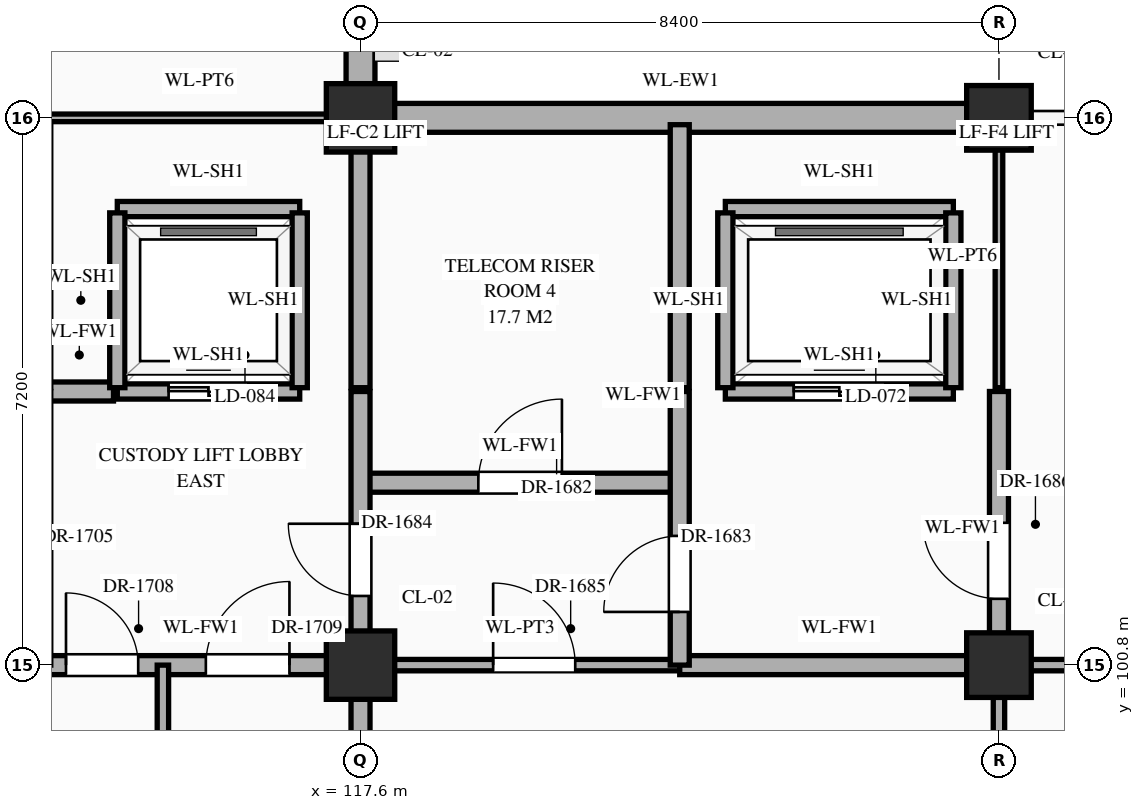
"""IFC4 building model, lengths in metres.
Left out: names, types, materials, properties, quantities, classifications, styles, units other than length and angle.
Written with IfcOpenShell. Run it as: python <this file> out.ifc"""

import sys

from ifc_helpers import new_model, si_unit, direction, frame, frame_2d, origin, origin_2d, place, context, subcontext, project, spatial, rectangle, extrude, element, fill, save


model = new_model("IFC4")
c1 = context("Model", 3, precision=1e-05, world=origin(), true_north=direction((0.0, 1.0)))
c2 = subcontext(c1, "Body", "Model", "MODEL_VIEW")
j1 = project(units=[si_unit("LENGTHUNIT", "METRE"), si_unit("PLANEANGLEUNIT", "RADIAN")], contexts=[c1])
p1 = place(None, origin())
s1 = spatial("IfcSite", under=j1, at=p1, CompositionType="ELEMENT")
p2 = place(p1, origin())
s2 = spatial("IfcBuilding", under=s1, at=p2, CompositionType="ELEMENT")
p3 = place(p2, frame((0.0, 0.0, 16.2)))
s3 = spatial("IfcBuildingStorey", under=s2, at=p3, CompositionType="ELEMENT", Elevation=16.2)
for number, where, z_axis, x_axis in (
    (1, (117.6, 100.8, 0.0), (0.0, 0.0, 1.0), (1.0, 0.0, 0.0)),
    (2, (117.6, 108.0, 0.0), (0.0, 0.0, 1.0), (1.0, 0.0, 0.0)),
):
    element("IfcColumn", number, at=place(p3, frame(where, z_axis=z_axis, x_axis=x_axis)), inside=s3, PredefinedType="COLUMN", context=c2, shape_type="SweptSolid", body=[
        extrude(rectangle(XDim=0.9, YDim=0.9, at=origin_2d()), origin(), (0.0, 0.0, 1.0), 5.4),
    ])
for number, where, z_axis, x_axis in (
    (3, (126.0, 100.8, 0.0), (0.0, 0.0, 1.0), (1.0, 0.0, 0.0)),
    (4, (126.0, 108.0, 0.0), (0.0, 0.0, 1.0), (1.0, 0.0, 0.0)),
):
    element("IfcColumn", number, at=place(p3, frame(where, z_axis=z_axis, x_axis=x_axis)), inside=s3, PredefinedType="COLUMN", context=c2, shape_type="SweptSolid", body=[
        extrude(rectangle(XDim=0.85, YDim=0.85, at=origin_2d()), origin(), (0.0, 0.0, 1.0), 5.4),
    ])
p4 = place(p3, frame((117.6, 108.445, 0.0), z_axis=(0.0, 0.0, 1.0), x_axis=(0.0, 1.0, 0.0)))
e5 = element("IfcWall", 5, at=p4, inside=s3, PredefinedType="STANDARD", context=c2, shape_type="SweptSolid", body=[
    extrude(rectangle(XDim=6.335, YDim=0.38, at=frame_2d((3.167, 0.0))), origin(), (0.0, 0.0, 1.0), 4.47),
])
p5 = place(p4, frame((3.78, 0.0, 0.85)))
e6 = element("IfcOpeningElement", 6, at=p5, cuts=e5, PredefinedType="OPENING", context=c2, shape_type="SweptSolid", body=[
    extrude(rectangle(XDim=1.35, YDim=1.38, at=frame_2d((0.675, 0.69))), frame((0.0, 0.202, 0.0), z_axis=(0.0, -1.0, 0.0), x_axis=(1.0, 0.0, 0.0)), (0.0, 0.0, 1.0), 0.404),
])
p6 = place(p3, frame((118.045, 108.0, 0.0), z_axis=(0.0, 0.0, 1.0), x_axis=(1.0, 0.0, 0.0)))
e7 = element("IfcWall", 7, at=p6, inside=s3, PredefinedType="STANDARD", context=c2, shape_type="SweptSolid", body=[
    extrude(rectangle(XDim=7.535, YDim=0.38, at=frame_2d((3.768, 0.0))), origin(), (0.0, 0.0, 1.0), 4.47),
])
p7 = place(p3, frame((113.4, 100.8, 0.0), z_axis=(0.0, 0.0, 1.0), x_axis=(1.0, 0.0, 0.0)))
e8 = element("IfcWall", 8, at=p7, inside=s3, PredefinedType="STANDARD", context=c2, shape_type="SweptSolid", body=[
    extrude(rectangle(XDim=4.2, YDim=0.25, at=frame_2d((2.1, 0.0))), origin(), (0.0, 0.0, 1.0), 4.27),
])
p8 = place(p7, frame((0.325, 0.0, 0.0)))
e9 = element("IfcOpeningElement", 9, at=p8, cuts=e8, PredefinedType="OPENING", context=c2, shape_type="SweptSolid", body=[
    extrude(rectangle(XDim=0.95, YDim=2.15, at=frame_2d((0.475, 1.075))), frame((0.0, 0.137, 0.0), z_axis=(0.0, -1.0, 0.0), x_axis=(1.0, 0.0, 0.0)), (0.0, 0.0, 1.0), 0.274),
])
p9 = place(p7, frame((2.165, 0.0, 0.0)))
e10 = element("IfcOpeningElement", 10, at=p9, cuts=e8, PredefinedType="OPENING", context=c2, shape_type="SweptSolid", body=[
    extrude(rectangle(XDim=1.1, YDim=2.2, at=frame_2d((0.55, 1.1))), frame((0.0, 0.137, 0.0), z_axis=(0.0, -1.0, 0.0), x_axis=(1.0, 0.0, 0.0)), (0.0, 0.0, 1.0), 0.274),
])
p10 = place(p3, frame((117.6, 100.8, 0.0), z_axis=(0.0, 0.0, 1.0), x_axis=(1.0, 0.0, 0.0)))
e11 = element("IfcWall", 11, at=p10, inside=s3, PredefinedType="STANDARD", context=c2, shape_type="SweptSolid", body=[
    extrude(rectangle(XDim=4.2, YDim=0.15, at=frame_2d((2.1, 0.0))), origin(), (0.0, 0.0, 1.0), 4.27),
])
p11 = place(p10, frame((1.745, 0.0, 0.0)))
e12 = element("IfcOpeningElement", 12, at=p11, cuts=e11, PredefinedType="OPENING", context=c2, shape_type="SweptSolid", body=[
    extrude(rectangle(XDim=1.08, YDim=2.25, at=frame_2d((0.54, 1.125))), frame((0.0, 0.087, 0.0), z_axis=(0.0, -1.0, 0.0), x_axis=(1.0, 0.0, 0.0)), (0.0, 0.0, 1.0), 0.174),
])
p12 = place(p3, frame((121.8, 100.8, 0.0), z_axis=(0.0, 0.0, 1.0), x_axis=(1.0, 0.0, 0.0)))
e13 = element("IfcWall", 13, at=p12, inside=s3, PredefinedType="STANDARD", context=c2, shape_type="SweptSolid", body=[
    extrude(rectangle(XDim=4.2, YDim=0.25, at=frame_2d((2.1, 0.0))), origin(), (0.0, 0.0, 1.0), 4.27),
])
p13 = place(p3, frame((126.0, 100.8, 0.0), z_axis=(0.0, 0.0, 1.0), x_axis=(1.0, 0.0, 0.0)))
e14 = element("IfcWall", 14, at=p13, inside=s3, PredefinedType="STANDARD", context=c2, shape_type="SweptSolid", body=[
    extrude(rectangle(XDim=8.4, YDim=0.15, at=frame_2d((4.2, 0.0))), origin(), (0.0, 0.0, 1.0), 4.27),
])
p14 = place(p13, frame((3.63, 0.0, 0.0)))
e15 = element("IfcOpeningElement", 15, at=p14, cuts=e14, PredefinedType="OPENING", context=c2, shape_type="SweptSolid", body=[
    extrude(rectangle(XDim=1.14, YDim=2.4, at=frame_2d((0.57, 1.2))), frame((0.0, 0.087, 0.0), z_axis=(0.0, -1.0, 0.0), x_axis=(1.0, 0.0, 0.0)), (0.0, 0.0, 1.0), 0.174),
])
p15 = place(p3, frame((117.6, 103.2, 0.0), z_axis=(0.0, 0.0, 1.0), x_axis=(1.0, 0.0, 0.0)))
e16 = element("IfcWall", 16, at=p15, inside=s3, PredefinedType="STANDARD", context=c2, shape_type="SweptSolid", body=[
    extrude(rectangle(XDim=4.2, YDim=0.25, at=frame_2d((2.1, 0.0))), origin(), (0.0, 0.0, 1.0), 5.12),
])
p16 = place(p15, frame((1.55, 0.0, 0.0)))
e17 = element("IfcOpeningElement", 17, at=p16, cuts=e16, PredefinedType="OPENING", context=c2, shape_type="SweptSolid", body=[
    extrude(rectangle(XDim=1.1, YDim=2.2, at=frame_2d((0.55, 1.1))), frame((0.0, 0.137, 0.0), z_axis=(0.0, -1.0, 0.0), x_axis=(1.0, 0.0, 0.0)), (0.0, 0.0, 1.0), 0.274),
])
p17 = place(p3, frame((126.0, 103.2, 0.0), z_axis=(0.0, 0.0, 1.0), x_axis=(1.0, 0.0, 0.0)))
e18 = element("IfcWall", 18, at=p17, inside=s3, PredefinedType="STANDARD", context=c2, shape_type="SweptSolid", body=[
    extrude(rectangle(XDim=41.96, YDim=0.1, at=frame_2d((20.98, 0.0))), origin(), (0.0, 0.0, 1.0), 5.05),
])
p18 = place(p17, frame((3.56, 0.0, 0.0)))
e19 = element("IfcOpeningElement", 19, at=p18, cuts=e18, PredefinedType="OPENING", context=c2, shape_type="SweptSolid", body=[
    extrude(rectangle(XDim=1.28, YDim=2.35, at=frame_2d((0.64, 1.175))), frame((0.0, 0.062, 0.0), z_axis=(0.0, -1.0, 0.0), x_axis=(1.0, 0.0, 0.0)), (0.0, 0.0, 1.0), 0.124),
])
p19 = place(p17, frame((12.13, 0.0, 0.0)))
e20 = element("IfcOpeningElement", 20, at=p19, cuts=e18, PredefinedType="OPENING", context=c2, shape_type="SweptSolid", body=[
    extrude(rectangle(XDim=0.94, YDim=2.3, at=frame_2d((0.47, 1.15))), frame((0.0, 0.062, 0.0), z_axis=(0.0, -1.0, 0.0), x_axis=(1.0, 0.0, 0.0)), (0.0, 0.0, 1.0), 0.124),
])
p20 = place(p17, frame((20.51, 0.0, 0.0)))
e21 = element("IfcOpeningElement", 21, at=p20, cuts=e18, PredefinedType="OPENING", context=c2, shape_type="SweptSolid", body=[
    extrude(rectangle(XDim=0.98, YDim=2.35, at=frame_2d((0.49, 1.175))), frame((0.0, 0.062, 0.0), z_axis=(0.0, -1.0, 0.0), x_axis=(1.0, 0.0, 0.0)), (0.0, 0.0, 1.0), 0.124),
])
p21 = place(p17, frame((28.89, 0.0, 0.0)))
e22 = element("IfcOpeningElement", 22, at=p21, cuts=e18, PredefinedType="OPENING", context=c2, shape_type="SweptSolid", body=[
    extrude(rectangle(XDim=1.02, YDim=2.4, at=frame_2d((0.51, 1.2))), frame((0.0, 0.062, 0.0), z_axis=(0.0, -1.0, 0.0), x_axis=(1.0, 0.0, 0.0)), (0.0, 0.0, 1.0), 0.124),
])
p22 = place(p17, frame((37.25, 0.0, 0.0)))
e23 = element("IfcOpeningElement", 23, at=p22, cuts=e18, PredefinedType="OPENING", context=c2, shape_type="SweptSolid", body=[
    extrude(rectangle(XDim=1.06, YDim=2.4, at=frame_2d((0.53, 1.2))), frame((0.0, 0.062, 0.0), z_axis=(0.0, -1.0, 0.0), x_axis=(1.0, 0.0, 0.0)), (0.0, 0.0, 1.0), 0.124),
])
p23 = place(p3, frame((113.45, 104.4, 0.0), z_axis=(0.0, 0.0, 1.0), x_axis=(1.0, 0.0, 0.0)))
e24 = element("IfcWall", 24, at=p23, inside=s3, PredefinedType="STANDARD", context=c2, shape_type="SweptSolid", body=[
    extrude(rectangle(XDim=0.9, YDim=0.25, at=frame_2d((0.45, 0.0))), origin(), (0.0, 0.0, 1.0), 5.12),
])
p24 = place(p3, frame((114.4, 104.4, 0.0), z_axis=(0.0, 0.0, 1.0), x_axis=(1.0, 0.0, 0.0)))
e25 = element("IfcWall", 25, at=p24, inside=s3, PredefinedType="STANDARD", context=c2, shape_type="SweptSolid", body=[
    extrude(rectangle(XDim=2.4, YDim=0.2, at=frame_2d((1.2, 0.0))), origin(), (0.0, 0.0, 1.0), 5.12),
])
p25 = place(p24, frame((0.675, 0.0, 0.0)))
e26 = element("IfcOpeningElement", 26, at=p25, cuts=e25, PredefinedType="OPENING", context=c2, shape_type="SweptSolid", body=[
    extrude(rectangle(XDim=1.05, YDim=2.15, at=frame_2d((0.525, 1.075))), frame((0.0, 0.112, 0.0), z_axis=(0.0, -1.0, 0.0), x_axis=(1.0, 0.0, 0.0)), (0.0, 0.0, 1.0), 0.224),
])
p26 = place(p3, frame((122.4, 104.4, 0.0), z_axis=(0.0, 0.0, 1.0), x_axis=(1.0, 0.0, 0.0)))
e27 = element("IfcWall", 27, at=p26, inside=s3, PredefinedType="STANDARD", context=c2, shape_type="SweptSolid", body=[
    extrude(rectangle(XDim=3.0, YDim=0.2, at=frame_2d((1.5, 0.0))), origin(), (0.0, 0.0, 1.0), 5.12),
])
p27 = place(p26, frame((0.9, 0.0, 0.0)))
e28 = element("IfcOpeningElement", 28, at=p27, cuts=e27, PredefinedType="OPENING", context=c2, shape_type="SweptSolid", body=[
    extrude(rectangle(XDim=1.2, YDim=2.15, at=frame_2d((0.6, 1.075))), frame((0.0, 0.112, 0.0), z_axis=(0.0, -1.0, 0.0), x_axis=(1.0, 0.0, 0.0)), (0.0, 0.0, 1.0), 0.224),
])
p28 = place(p3, frame((114.4, 106.8, 0.0), z_axis=(0.0, 0.0, 1.0), x_axis=(1.0, 0.0, 0.0)))
e29 = element("IfcWall", 29, at=p28, inside=s3, PredefinedType="STANDARD", context=c2, shape_type="SweptSolid", body=[
    extrude(rectangle(XDim=2.4, YDim=0.2, at=frame_2d((1.2, 0.0))), origin(), (0.0, 0.0, 1.0), 5.12),
])
p29 = place(p3, frame((122.4, 106.8, 0.0), z_axis=(0.0, 0.0, 1.0), x_axis=(1.0, 0.0, 0.0)))
e30 = element("IfcWall", 30, at=p29, inside=s3, PredefinedType="STANDARD", context=c2, shape_type="SweptSolid", body=[
    extrude(rectangle(XDim=3.0, YDim=0.2, at=frame_2d((1.5, 0.0))), origin(), (0.0, 0.0, 1.0), 5.12),
])
p30 = place(p3, frame((113.45, 108.0, 0.0), z_axis=(0.0, 0.0, 1.0), x_axis=(1.0, 0.0, 0.0)))
e31 = element("IfcWall", 31, at=p30, inside=s3, PredefinedType="STANDARD", context=c2, shape_type="SweptSolid", body=[
    extrude(rectangle(XDim=4.06, YDim=0.1, at=frame_2d((2.03, 0.0))), origin(), (0.0, 0.0, 1.0), 4.27),
])
p31 = place(p3, frame((114.4, 104.45, 0.0), z_axis=(0.0, 0.0, 1.0), x_axis=(0.0, 1.0, 0.0)))
e32 = element("IfcWall", 32, at=p31, inside=s3, PredefinedType="STANDARD", context=c2, shape_type="SweptSolid", body=[
    extrude(rectangle(XDim=2.3, YDim=0.2, at=frame_2d((1.15, 0.0))), origin(), (0.0, 0.0, 1.0), 5.12),
])
p32 = place(p3, frame((115.0, 96.0, 0.0), z_axis=(0.0, 0.0, 1.0), x_axis=(0.0, 1.0, 0.0)))
e33 = element("IfcWall", 33, at=p32, inside=s3, PredefinedType="STANDARD", context=c2, shape_type="SweptSolid", body=[
    extrude(rectangle(XDim=4.8, YDim=0.15, at=frame_2d((2.4, 0.0))), origin(), (0.0, 0.0, 1.0), 5.12),
])
p33 = place(p32, frame((1.83, 0.0, 0.0)))
e34 = element("IfcOpeningElement", 34, at=p33, cuts=e33, PredefinedType="OPENING", context=c2, shape_type="SweptSolid", body=[
    extrude(rectangle(XDim=1.14, YDim=2.4, at=frame_2d((0.57, 1.2))), frame((0.0, 0.087, 0.0), z_axis=(0.0, -1.0, 0.0), x_axis=(1.0, 0.0, 0.0)), (0.0, 0.0, 1.0), 0.174),
])
p34 = place(p3, frame((116.8, 104.45, 0.0), z_axis=(0.0, 0.0, 1.0), x_axis=(0.0, 1.0, 0.0)))
e35 = element("IfcWall", 35, at=p34, inside=s3, PredefinedType="STANDARD", context=c2, shape_type="SweptSolid", body=[
    extrude(rectangle(XDim=2.3, YDim=0.2, at=frame_2d((1.15, 0.0))), origin(), (0.0, 0.0, 1.0), 5.12),
])
p35 = place(p3, frame((117.6, 91.2, 0.0), z_axis=(0.0, 0.0, 1.0), x_axis=(0.0, 1.0, 0.0)))
e36 = element("IfcWall", 36, at=p35, inside=s3, PredefinedType="STANDARD", context=c2, shape_type="SweptSolid", body=[
    extrude(rectangle(XDim=13.2, YDim=0.25, at=frame_2d((6.6, 0.0))), origin(), (0.0, 0.0, 1.0), 4.37),
])
p36 = place(p35, frame((0.465, 0.0, 0.0)))
e37 = element("IfcOpeningElement", 37, at=p36, cuts=e36, PredefinedType="OPENING", context=c2, shape_type="SweptSolid", body=[
    extrude(rectangle(XDim=1.1, YDim=2.2, at=frame_2d((0.55, 1.1))), frame((0.0, 0.137, 0.0), z_axis=(0.0, -1.0, 0.0), x_axis=(1.0, 0.0, 0.0)), (0.0, 0.0, 1.0), 0.274),
])
p37 = place(p35, frame((10.51, 0.0, 0.0)))
e38 = element("IfcOpeningElement", 38, at=p37, cuts=e36, PredefinedType="OPENING", context=c2, shape_type="SweptSolid", body=[
    extrude(rectangle(XDim=0.95, YDim=2.15, at=frame_2d((0.475, 1.075))), frame((0.0, 0.137, 0.0), z_axis=(0.0, -1.0, 0.0), x_axis=(1.0, 0.0, 0.0)), (0.0, 0.0, 1.0), 0.274),
])
p38 = place(p35, frame((3.235, 0.0, 0.0)))
e39 = element("IfcOpeningElement", 39, at=p38, cuts=e36, PredefinedType="OPENING", context=c2, shape_type="SweptSolid", body=[
    extrude(rectangle(XDim=1.1, YDim=2.2, at=frame_2d((0.55, 1.1))), frame((0.0, 0.137, 0.0), z_axis=(0.0, -1.0, 0.0), x_axis=(1.0, 0.0, 0.0)), (0.0, 0.0, 1.0), 0.274),
])
p39 = place(p3, frame((117.6, 104.45, 0.0), z_axis=(0.0, 0.0, 1.0), x_axis=(0.0, 1.0, 0.0)))
e40 = element("IfcWall", 40, at=p39, inside=s3, PredefinedType="STANDARD", context=c2, shape_type="SweptSolid", body=[
    extrude(rectangle(XDim=3.46, YDim=0.25, at=frame_2d((1.73, 0.0))), origin(), (0.0, 0.0, 1.0), 4.37),
])
p40 = place(p3, frame((121.8, 100.8, 0.0), z_axis=(0.0, 0.0, 1.0), x_axis=(0.0, 1.0, 0.0)))
e41 = element("IfcWall", 41, at=p40, inside=s3, PredefinedType="STANDARD", context=c2, shape_type="SweptSolid", body=[
    extrude(rectangle(XDim=3.6, YDim=0.25, at=frame_2d((1.8, 0.0))), origin(), (0.0, 0.0, 1.0), 4.72),
])
p41 = place(p40, frame((0.7, 0.0, 0.0)))
e42 = element("IfcOpeningElement", 42, at=p41, cuts=e41, PredefinedType="OPENING", context=c2, shape_type="SweptSolid", body=[
    extrude(rectangle(XDim=1.0, YDim=2.2, at=frame_2d((0.5, 1.1))), frame((0.0, 0.137, 0.0), z_axis=(0.0, -1.0, 0.0), x_axis=(1.0, 0.0, 0.0)), (0.0, 0.0, 1.0), 0.274),
])
p42 = place(p3, frame((121.8, 104.45, 0.0), z_axis=(0.0, 0.0, 1.0), x_axis=(0.0, 1.0, 0.0)))
e43 = element("IfcWall", 43, at=p42, inside=s3, PredefinedType="STANDARD", context=c2, shape_type="SweptSolid", body=[
    extrude(rectangle(XDim=3.46, YDim=0.25, at=frame_2d((1.73, 0.0))), origin(), (0.0, 0.0, 1.0), 4.72),
])
for number, where, z_axis, x_axis in (
    (44, (122.4, 104.45, 0.0), (0.0, 0.0, 1.0), (0.0, 1.0, 0.0)),
    (45, (125.4, 104.45, 0.0), (0.0, 0.0, 1.0), (0.0, 1.0, 0.0)),
):
    element("IfcWall", number, at=place(p3, frame(where, z_axis=z_axis, x_axis=x_axis)), inside=s3, PredefinedType="STANDARD", context=c2, shape_type="SweptSolid", body=[
        extrude(rectangle(XDim=2.3, YDim=0.2, at=frame_2d((1.15, 0.0))), origin(), (0.0, 0.0, 1.0), 5.12),
    ])
p43 = place(p3, frame((126.0, 96.0, 0.0), z_axis=(0.0, 0.0, 1.0), x_axis=(0.0, 1.0, 0.0)))
e46 = element("IfcWall", 46, at=p43, inside=s3, PredefinedType="STANDARD", context=c2, shape_type="SweptSolid", body=[
    extrude(rectangle(XDim=4.8, YDim=0.15, at=frame_2d((2.4, 0.0))), origin(), (0.0, 0.0, 1.0), 4.37),
])
p44 = place(p3, frame((126.0, 100.8, 0.0), z_axis=(0.0, 0.0, 1.0), x_axis=(0.0, 1.0, 0.0)))
e47 = element("IfcWall", 47, at=p44, inside=s3, PredefinedType="STANDARD", context=c2, shape_type="SweptSolid", body=[
    extrude(rectangle(XDim=3.6, YDim=0.25, at=frame_2d((1.8, 0.0))), origin(), (0.0, 0.0, 1.0), 4.37),
])
p45 = place(p44, frame((0.873, 0.0, 0.0)))
e48 = element("IfcOpeningElement", 48, at=p45, cuts=e47, PredefinedType="OPENING", context=c2, shape_type="SweptSolid", body=[
    extrude(rectangle(XDim=1.0, YDim=2.2, at=frame_2d((0.5, 1.1))), frame((0.0, 0.137, 0.0), z_axis=(0.0, -1.0, 0.0), x_axis=(1.0, 0.0, 0.0)), (0.0, 0.0, 1.0), 0.274),
])
p46 = place(p3, frame((126.0, 104.45, 0.0), z_axis=(0.0, 0.0, 1.0), x_axis=(0.0, 1.0, 0.0)))
e49 = element("IfcWall", 49, at=p46, inside=s3, PredefinedType="STANDARD", context=c2, shape_type="SweptSolid", body=[
    extrude(rectangle(XDim=3.46, YDim=0.1, at=frame_2d((1.73, 0.0))), origin(), (0.0, 0.0, 1.0), 4.37),
])
p47 = place(p27, origin())
e50 = element("IfcDoor", 50, at=p47, inside=s3, OperationType="DOUBLE_DOOR_SLIDING", PredefinedType="DOOR", context=c2, shape_type="SweptSolid", body=[
    extrude(rectangle(XDim=1.2, YDim=2.15, at=frame_2d((0.6, 1.075))), frame((0.0, 0.025, 0.0), z_axis=(0.0, -1.0, 0.0), x_axis=(1.0, 0.0, 0.0)), (0.0, 0.0, 1.0), 0.05),
])
fill(e28, e50)
p48 = place(p25, origin())
e51 = element("IfcDoor", 51, at=p48, inside=s3, OperationType="DOUBLE_DOOR_SLIDING", PredefinedType="DOOR", context=c2, shape_type="SweptSolid", body=[
    extrude(rectangle(XDim=1.05, YDim=2.15, at=frame_2d((0.525, 1.075))), frame((0.0, 0.025, 0.0), z_axis=(0.0, -1.0, 0.0), x_axis=(1.0, 0.0, 0.0)), (0.0, 0.0, 1.0), 0.05),
])
fill(e26, e51)
p49 = place(p16, origin())
e52 = element("IfcDoor", 52, at=p49, inside=s3, OperationType="SINGLE_SWING_RIGHT", PredefinedType="DOOR", context=c2, shape_type="SweptSolid", body=[
    extrude(rectangle(XDim=1.1, YDim=2.2, at=frame_2d((0.55, 1.1))), frame((0.0, 0.025, 0.0), z_axis=(0.0, -1.0, 0.0), x_axis=(1.0, 0.0, 0.0)), (0.0, 0.0, 1.0), 0.05),
])
fill(e17, e52)
p50 = place(p41, origin())
e53 = element("IfcDoor", 53, at=p50, inside=s3, OperationType="SINGLE_SWING_LEFT", PredefinedType="DOOR", context=c2, shape_type="SweptSolid", body=[
    extrude(rectangle(XDim=1.0, YDim=2.2, at=frame_2d((0.5, 1.1))), frame((0.0, 0.025, 0.0), z_axis=(0.0, -1.0, 0.0), x_axis=(1.0, 0.0, 0.0)), (0.0, 0.0, 1.0), 0.05),
])
fill(e42, e53)
p51 = place(p37, origin())
e54 = element("IfcDoor", 54, at=p51, inside=s3, OperationType="SINGLE_SWING_RIGHT", PredefinedType="DOOR", context=c2, shape_type="SweptSolid", body=[
    extrude(rectangle(XDim=0.95, YDim=2.15, at=frame_2d((0.475, 1.075))), frame((0.0, 0.025, 0.0), z_axis=(0.0, -1.0, 0.0), x_axis=(1.0, 0.0, 0.0)), (0.0, 0.0, 1.0), 0.05),
])
fill(e38, e54)
p52 = place(p11, origin())
e55 = element("IfcDoor", 55, at=p52, inside=s3, OperationType="SINGLE_SWING_LEFT", PredefinedType="DOOR", context=c2, shape_type="SweptSolid", body=[
    extrude(rectangle(XDim=1.08, YDim=2.25, at=frame_2d((0.54, 1.125))), frame((0.0, 0.025, 0.0), z_axis=(0.0, -1.0, 0.0), x_axis=(1.0, 0.0, 0.0)), (0.0, 0.0, 1.0), 0.05),
])
fill(e12, e55)
p53 = place(p45, origin())
e56 = element("IfcDoor", 56, at=p53, inside=s3, OperationType="SINGLE_SWING_RIGHT", PredefinedType="DOOR", context=c2, shape_type="SweptSolid", body=[
    extrude(rectangle(XDim=1.0, YDim=2.2, at=frame_2d((0.5, 1.1))), frame((0.0, 0.025, 0.0), z_axis=(0.0, -1.0, 0.0), x_axis=(1.0, 0.0, 0.0)), (0.0, 0.0, 1.0), 0.05),
])
fill(e48, e56)
p54 = place(p8, origin())
e57 = element("IfcDoor", 57, at=p54, inside=s3, OperationType="SINGLE_SWING_LEFT", PredefinedType="DOOR", context=c2, shape_type="SweptSolid", body=[
    extrude(rectangle(XDim=0.95, YDim=2.15, at=frame_2d((0.475, 1.075))), frame((0.0, 0.025, 0.0), z_axis=(0.0, -1.0, 0.0), x_axis=(1.0, 0.0, 0.0)), (0.0, 0.0, 1.0), 0.05),
])
fill(e9, e57)
p55 = place(p9, origin())
e58 = element("IfcDoor", 58, at=p55, inside=s3, OperationType="SINGLE_SWING_RIGHT", PredefinedType="DOOR", context=c2, shape_type="SweptSolid", body=[
    extrude(rectangle(XDim=1.1, YDim=2.2, at=frame_2d((0.55, 1.1))), frame((0.0, 0.025, 0.0), z_axis=(0.0, -1.0, 0.0), x_axis=(1.0, 0.0, 0.0)), (0.0, 0.0, 1.0), 0.05),
])
fill(e10, e58)
save(model, sys.argv[1])
